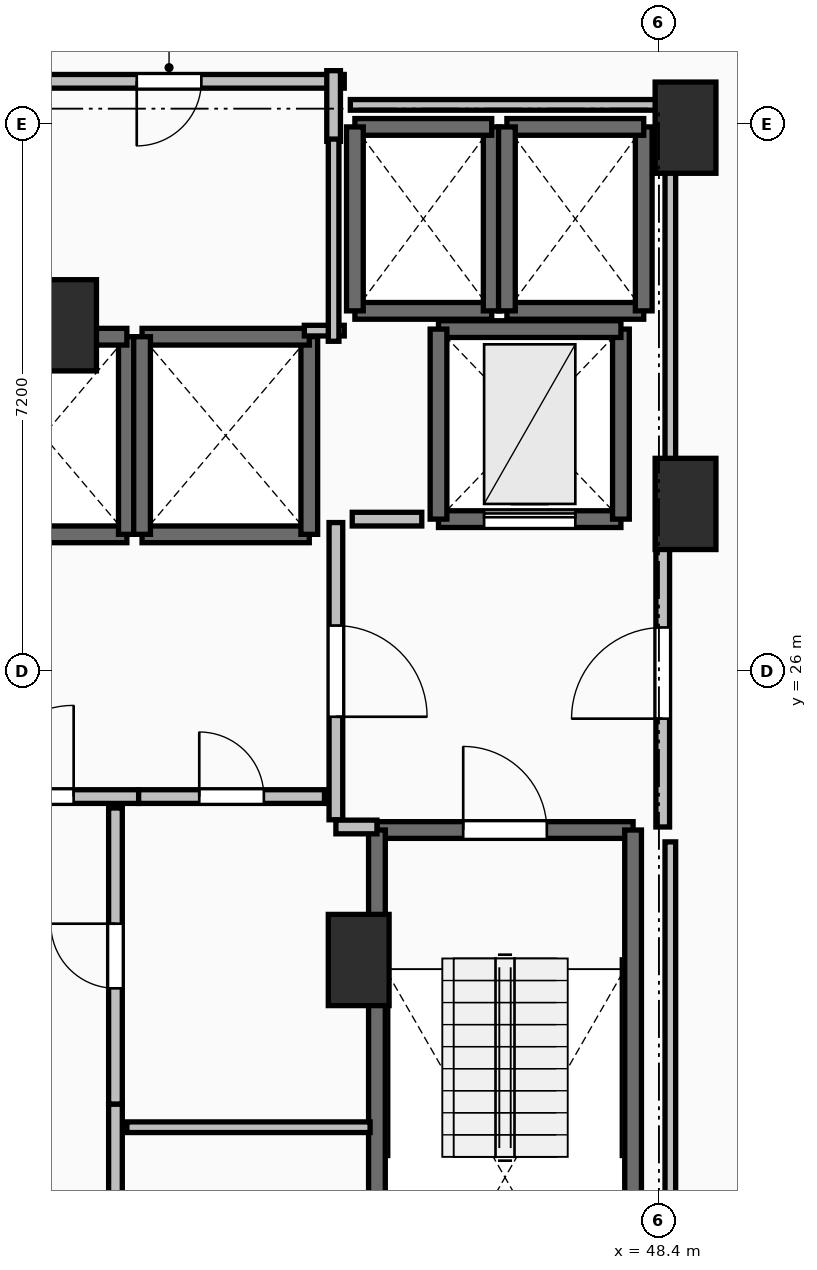
"""IFC4 building model, lengths in metres.
Left out: names, types, materials, properties, quantities, classifications, styles, units other than length and angle.
Written with IfcOpenShell. Run it as: python <this file> out.ifc"""

import sys

from ifc_helpers import new_model, si_unit, direction, frame, frame_2d, origin, origin_2d, place, context, subcontext, project, spatial, rectangle, extrude, element, fill, save


model = new_model("IFC4")
c1 = context("Model", 3, precision=1e-05, world=origin(), true_north=direction((0.0, 1.0)))
c2 = subcontext(c1, "Body", "Model", "MODEL_VIEW")
j1 = project(units=[si_unit("LENGTHUNIT", "METRE"), si_unit("PLANEANGLEUNIT", "RADIAN")], contexts=[c1])
p1 = place(None, origin())
s1 = spatial("IfcSite", under=j1, at=p1, CompositionType="ELEMENT")
p2 = place(p1, origin())
s2 = spatial("IfcBuilding", under=s1, at=p2, CompositionType="ELEMENT")
p3 = place(p2, frame((0.0, 0.0, 164.1)))
s3 = spatial("IfcBuildingStorey", under=s2, at=p3, CompositionType="ELEMENT", Elevation=164.1)
for number, where, z_axis, x_axis in (
    (1, (48.75, 33.15, 0.0), (0.0, 0.0, 1.0), (1.0, 0.0, 0.0)),
    (2, (48.75, 28.2, 0.0), (0.0, 0.0, 1.0), (1.0, 0.0, 0.0)),
    (3, (44.45, 22.2, 0.0), (0.0, 0.0, 1.0), (1.0, 0.0, 0.0)),
    (4, (40.6, 30.55, 0.0), (0.0, 0.0, 1.0), (1.0, 0.0, 0.0)),
):
    element("IfcColumn", number, at=place(p3, frame(where, z_axis=z_axis, x_axis=x_axis)), inside=s3, PredefinedType="PILASTER", context=c2, shape_type="SweptSolid", body=[
        extrude(rectangle(XDim=0.8, YDim=1.2, at=origin_2d()), origin(), (0.0, 0.0, 1.0), 3.5),
    ])
p4 = place(p3, frame((44.69, 23.91, 0.0), z_axis=(0.0, 0.0, 1.0), x_axis=(1.0, 0.0, 0.0)))
e5 = element("IfcWall", 5, at=p4, inside=s3, PredefinedType="SOLIDWALL", context=c2, shape_type="SweptSolid", body=[
    extrude(rectangle(XDim=3.37, YDim=0.22, at=frame_2d((1.685, 0.0))), origin(), (0.0, 0.0, 1.0), 3.24),
])
p5 = place(p4, frame((1.135, 0.0, 0.0)))
e6 = element("IfcOpeningElement", 6, at=p5, cuts=e5, PredefinedType="OPENING", context=c2, shape_type="SweptSolid", body=[
    extrude(rectangle(XDim=1.1, YDim=2.15, at=frame_2d((0.55, 1.075))), frame((0.0, 0.125, 0.0), z_axis=(0.0, -1.0, 0.0), x_axis=(1.0, 0.0, 0.0)), (0.0, 0.0, 1.0), 0.25),
])
for number, where, z_axis, x_axis in (
    (7, (48.06, 23.91, 0.0), (0.0, 0.0, 1.0), (0.0, -1.0, 0.0)),
    (8, (44.69, 16.49, 0.0), (0.0, 0.0, 1.0), (0.0, 1.0, 0.0)),
):
    element("IfcWall", number, at=place(p3, frame(where, z_axis=z_axis, x_axis=x_axis)), inside=s3, PredefinedType="SOLIDWALL", context=c2, shape_type="SweptSolid", body=[
        extrude(rectangle(XDim=7.42, YDim=0.22, at=frame_2d((3.71, 0.0))), origin(), (0.0, 0.0, 1.0), 3.24),
    ])
p6 = place(p3, frame((39.2, 27.8, 0.0), z_axis=(0.0, 0.0, 1.0), x_axis=(1.0, 0.0, 0.0)))
e9 = element("IfcWall", 9, at=p6, inside=s3, PredefinedType="SOLIDWALL", context=c2, shape_type="SweptSolid", body=[
    extrude(rectangle(XDim=2.2, YDim=0.22, at=frame_2d((1.1, 0.0))), origin(), (0.0, 0.0, 1.0), 3.24),
])
p7 = place(p3, frame((41.4, 27.8, 0.0), z_axis=(0.0, 0.0, 1.0), x_axis=(0.0, 1.0, 0.0)))
e10 = element("IfcWall", 10, at=p7, inside=s3, PredefinedType="SOLIDWALL", context=c2, shape_type="SweptSolid", body=[
    extrude(rectangle(XDim=2.6, YDim=0.22, at=frame_2d((1.3, 0.0))), origin(), (0.0, 0.0, 1.0), 3.24),
])
for number, where, z_axis, x_axis in (
    (11, (41.4, 30.4, 0.0), (0.0, 0.0, 1.0), (-1.0, 0.0, 0.0)),
    (12, (41.6, 27.8, 0.0), (0.0, 0.0, 1.0), (1.0, 0.0, 0.0)),
):
    element("IfcWall", number, at=place(p3, frame(where, z_axis=z_axis, x_axis=x_axis)), inside=s3, PredefinedType="SOLIDWALL", context=c2, shape_type="SweptSolid", body=[
        extrude(rectangle(XDim=2.2, YDim=0.22, at=frame_2d((1.1, 0.0))), origin(), (0.0, 0.0, 1.0), 3.24),
    ])
p8 = place(p3, frame((43.8, 27.8, 0.0), z_axis=(0.0, 0.0, 1.0), x_axis=(0.0, 1.0, 0.0)))
e13 = element("IfcWall", 13, at=p8, inside=s3, PredefinedType="SOLIDWALL", context=c2, shape_type="SweptSolid", body=[
    extrude(rectangle(XDim=2.6, YDim=0.22, at=frame_2d((1.3, 0.0))), origin(), (0.0, 0.0, 1.0), 3.24),
])
p9 = place(p3, frame((43.8, 30.4, 0.0), z_axis=(0.0, 0.0, 1.0), x_axis=(-1.0, 0.0, 0.0)))
e14 = element("IfcWall", 14, at=p9, inside=s3, PredefinedType="SOLIDWALL", context=c2, shape_type="SweptSolid", body=[
    extrude(rectangle(XDim=2.2, YDim=0.22, at=frame_2d((1.1, 0.0))), origin(), (0.0, 0.0, 1.0), 3.24),
])
p10 = place(p3, frame((41.6, 30.4, 0.0), z_axis=(0.0, 0.0, 1.0), x_axis=(0.0, -1.0, 0.0)))
e15 = element("IfcWall", 15, at=p10, inside=s3, PredefinedType="SOLIDWALL", context=c2, shape_type="SweptSolid", body=[
    extrude(rectangle(XDim=2.6, YDim=0.22, at=frame_2d((1.3, 0.0))), origin(), (0.0, 0.0, 1.0), 3.24),
])
p11 = place(p3, frame((44.4, 30.74, 0.0), z_axis=(0.0, 0.0, 1.0), x_axis=(1.0, 0.0, 0.0)))
e16 = element("IfcWall", 16, at=p11, inside=s3, PredefinedType="SOLIDWALL", context=c2, shape_type="SweptSolid", body=[
    extrude(rectangle(XDim=1.8, YDim=0.22, at=frame_2d((0.9, 0.0))), origin(), (0.0, 0.0, 1.0), 3.24),
])
p12 = place(p3, frame((46.2, 30.74, 0.0), z_axis=(0.0, 0.0, 1.0), x_axis=(0.0, 1.0, 0.0)))
e17 = element("IfcWall", 17, at=p12, inside=s3, PredefinedType="SOLIDWALL", context=c2, shape_type="SweptSolid", body=[
    extrude(rectangle(XDim=2.42, YDim=0.22, at=frame_2d((1.21, 0.0))), origin(), (0.0, 0.0, 1.0), 3.24),
])
p13 = place(p3, frame((46.2, 33.16, 0.0), z_axis=(0.0, 0.0, 1.0), x_axis=(-1.0, 0.0, 0.0)))
e18 = element("IfcWall", 18, at=p13, inside=s3, PredefinedType="SOLIDWALL", context=c2, shape_type="SweptSolid", body=[
    extrude(rectangle(XDim=1.8, YDim=0.22, at=frame_2d((0.9, 0.0))), origin(), (0.0, 0.0, 1.0), 3.24),
])
p14 = place(p3, frame((44.4, 33.16, 0.0), z_axis=(0.0, 0.0, 1.0), x_axis=(0.0, -1.0, 0.0)))
e19 = element("IfcWall", 19, at=p14, inside=s3, PredefinedType="SOLIDWALL", context=c2, shape_type="SweptSolid", body=[
    extrude(rectangle(XDim=2.42, YDim=0.22, at=frame_2d((1.21, 0.0))), origin(), (0.0, 0.0, 1.0), 3.24),
])
p15 = place(p3, frame((46.4, 30.74, 0.0), z_axis=(0.0, 0.0, 1.0), x_axis=(1.0, 0.0, 0.0)))
e20 = element("IfcWall", 20, at=p15, inside=s3, PredefinedType="SOLIDWALL", context=c2, shape_type="SweptSolid", body=[
    extrude(rectangle(XDim=1.8, YDim=0.22, at=frame_2d((0.9, 0.0))), origin(), (0.0, 0.0, 1.0), 3.24),
])
p16 = place(p3, frame((48.2, 30.74, 0.0), z_axis=(0.0, 0.0, 1.0), x_axis=(0.0, 1.0, 0.0)))
e21 = element("IfcWall", 21, at=p16, inside=s3, PredefinedType="SOLIDWALL", context=c2, shape_type="SweptSolid", body=[
    extrude(rectangle(XDim=2.42, YDim=0.22, at=frame_2d((1.21, 0.0))), origin(), (0.0, 0.0, 1.0), 3.24),
])
p17 = place(p3, frame((48.2, 33.16, 0.0), z_axis=(0.0, 0.0, 1.0), x_axis=(-1.0, 0.0, 0.0)))
e22 = element("IfcWall", 22, at=p17, inside=s3, PredefinedType="SOLIDWALL", context=c2, shape_type="SweptSolid", body=[
    extrude(rectangle(XDim=1.8, YDim=0.22, at=frame_2d((0.9, 0.0))), origin(), (0.0, 0.0, 1.0), 3.24),
])
p18 = place(p3, frame((46.4, 33.16, 0.0), z_axis=(0.0, 0.0, 1.0), x_axis=(0.0, -1.0, 0.0)))
e23 = element("IfcWall", 23, at=p18, inside=s3, PredefinedType="SOLIDWALL", context=c2, shape_type="SweptSolid", body=[
    extrude(rectangle(XDim=2.42, YDim=0.22, at=frame_2d((1.21, 0.0))), origin(), (0.0, 0.0, 1.0), 3.24),
])
p19 = place(p3, frame((45.5, 28.0, 0.0), z_axis=(0.0, 0.0, 1.0), x_axis=(1.0, 0.0, 0.0)))
e24 = element("IfcWall", 24, at=p19, inside=s3, PredefinedType="SHEAR", context=c2, shape_type="SweptSolid", body=[
    extrude(rectangle(XDim=2.4, YDim=0.22, at=frame_2d((1.2, 0.0))), origin(), (0.0, 0.0, 1.0), 3.24),
])
p20 = place(p19, frame((0.6, 0.0, 0.0)))
e25 = element("IfcOpeningElement", 25, at=p20, cuts=e24, PredefinedType="OPENING", context=c2, shape_type="SweptSolid", body=[
    extrude(rectangle(XDim=1.2, YDim=2.2, at=frame_2d((0.6, 1.1))), frame((0.0, 0.125, 0.0), z_axis=(0.0, -1.0, 0.0), x_axis=(1.0, 0.0, 0.0)), (0.0, 0.0, 1.0), 0.25),
])
p21 = place(p3, frame((47.9, 28.0, 0.0), z_axis=(0.0, 0.0, 1.0), x_axis=(0.0, 1.0, 0.0)))
e26 = element("IfcWall", 26, at=p21, inside=s3, PredefinedType="SHEAR", context=c2, shape_type="SweptSolid", body=[
    extrude(rectangle(XDim=2.5, YDim=0.22, at=frame_2d((1.25, 0.0))), origin(), (0.0, 0.0, 1.0), 3.24),
])
p22 = place(p3, frame((47.9, 30.5, 0.0), z_axis=(0.0, 0.0, 1.0), x_axis=(-1.0, 0.0, 0.0)))
e27 = element("IfcWall", 27, at=p22, inside=s3, PredefinedType="SHEAR", context=c2, shape_type="SweptSolid", body=[
    extrude(rectangle(XDim=2.4, YDim=0.22, at=frame_2d((1.2, 0.0))), origin(), (0.0, 0.0, 1.0), 3.24),
])
p23 = place(p3, frame((45.5, 30.5, 0.0), z_axis=(0.0, 0.0, 1.0), x_axis=(0.0, -1.0, 0.0)))
e28 = element("IfcWall", 28, at=p23, inside=s3, PredefinedType="SHEAR", context=c2, shape_type="SweptSolid", body=[
    extrude(rectangle(XDim=2.5, YDim=0.22, at=frame_2d((1.25, 0.0))), origin(), (0.0, 0.0, 1.0), 3.24),
])
p24 = place(p3, frame((44.15, 27.955, 0.0), z_axis=(0.0, 0.0, 1.0), x_axis=(0.0, -1.0, 0.0)))
e29 = element("IfcWall", 29, at=p24, inside=s3, PredefinedType="PARTITIONING", context=c2, shape_type="SweptSolid", body=[
    extrude(rectangle(XDim=3.91, YDim=0.18, at=frame_2d((1.955, 0.0))), origin(), (0.0, 0.0, 1.0), 3.24),
])
p25 = place(p24, frame((1.355, 0.0, 0.0)))
e30 = element("IfcOpeningElement", 30, at=p25, cuts=e29, PredefinedType="OPENING", context=c2, shape_type="SweptSolid", body=[
    extrude(rectangle(XDim=1.2, YDim=2.15, at=frame_2d((0.6, 1.075))), frame((0.0, 0.105, 0.0), z_axis=(0.0, -1.0, 0.0), x_axis=(1.0, 0.0, 0.0)), (0.0, 0.0, 1.0), 0.21),
])
p26 = place(p3, frame((44.15, 23.95, 0.0), z_axis=(0.0, 0.0, 1.0), x_axis=(1.0, 0.0, 0.0)))
e31 = element("IfcWall", 31, at=p26, inside=s3, PredefinedType="PARTITIONING", context=c2, shape_type="SweptSolid", body=[
    extrude(rectangle(XDim=0.54, YDim=0.18, at=frame_2d((0.27, 0.0))), origin(), (0.0, 0.0, 1.0), 3.24),
])
p27 = place(p3, frame((48.45, 23.95, 0.0), z_axis=(0.0, 0.0, 1.0), x_axis=(0.0, 1.0, 0.0)))
e32 = element("IfcWall", 32, at=p27, inside=s3, PredefinedType="PARTITIONING", context=c2, shape_type="SweptSolid", body=[
    extrude(rectangle(XDim=4.05, YDim=0.18, at=frame_2d((2.025, 0.0))), origin(), (0.0, 0.0, 1.0), 3.24),
])
p28 = place(p27, frame((1.425, 0.0, 0.0)))
e33 = element("IfcOpeningElement", 33, at=p28, cuts=e32, PredefinedType="OPENING", context=c2, shape_type="SweptSolid", body=[
    extrude(rectangle(XDim=1.2, YDim=2.15, at=frame_2d((0.6, 1.075))), frame((0.0, 0.105, 0.0), z_axis=(0.0, -1.0, 0.0), x_axis=(1.0, 0.0, 0.0)), (0.0, 0.0, 1.0), 0.21),
])
p29 = place(p3, frame((38.645, 24.35, 0.0), z_axis=(0.0, 0.0, 1.0), x_axis=(1.0, 0.0, 0.0)))
e34 = element("IfcWall", 34, at=p29, inside=s3, PredefinedType="PARTITIONING", context=c2, shape_type="SweptSolid", body=[
    extrude(rectangle(XDim=2.91, YDim=0.18, at=frame_2d((1.455, 0.0))), origin(), (0.0, 0.0, 1.0), 3.24),
])
p30 = place(p29, frame((0.855, 0.0, 0.0)))
e35 = element("IfcOpeningElement", 35, at=p30, cuts=e34, PredefinedType="OPENING", context=c2, shape_type="SweptSolid", body=[
    extrude(rectangle(XDim=1.2, YDim=2.15, at=frame_2d((0.6, 1.075))), frame((0.0, 0.105, 0.0), z_axis=(0.0, -1.0, 0.0), x_axis=(1.0, 0.0, 0.0)), (0.0, 0.0, 1.0), 0.21),
])
p31 = place(p3, frame((41.555, 24.35, 0.0), z_axis=(0.0, 0.0, 1.0), x_axis=(1.0, 0.0, 0.0)))
e36 = element("IfcWall", 36, at=p31, inside=s3, PredefinedType="PARTITIONING", context=c2, shape_type="SweptSolid", body=[
    extrude(rectangle(XDim=2.445, YDim=0.18, at=frame_2d((1.223, 0.0))), origin(), (0.0, 0.0, 1.0), 3.24),
])
p32 = place(p31, frame((0.798, 0.0, 0.0)))
e37 = element("IfcOpeningElement", 37, at=p32, cuts=e36, PredefinedType="OPENING", context=c2, shape_type="SweptSolid", body=[
    extrude(rectangle(XDim=0.85, YDim=2.1, at=frame_2d((0.425, 1.05))), frame((0.0, 0.105, 0.0), z_axis=(0.0, -1.0, 0.0), x_axis=(1.0, 0.0, 0.0)), (0.0, 0.0, 1.0), 0.21),
])
p33 = place(p3, frame((41.25, 16.32, 0.0), z_axis=(0.0, 0.0, 1.0), x_axis=(0.0, 1.0, 0.0)))
e38 = element("IfcWall", 38, at=p33, inside=s3, PredefinedType="PARTITIONING", context=c2, shape_type="SweptSolid", body=[
    extrude(rectangle(XDim=3.985, YDim=0.18, at=frame_2d((1.992, 0.0))), origin(), (0.0, 0.0, 1.0), 3.24),
])
p34 = place(p33, frame((1.593, 0.0, 0.0)))
e39 = element("IfcOpeningElement", 39, at=p34, cuts=e38, PredefinedType="OPENING", context=c2, shape_type="SweptSolid", body=[
    extrude(rectangle(XDim=0.8, YDim=2.05, at=frame_2d((0.4, 1.025))), frame((0.0, 0.105, 0.0), z_axis=(0.0, -1.0, 0.0), x_axis=(1.0, 0.0, 0.0)), (0.0, 0.0, 1.0), 0.21),
])
p35 = place(p3, frame((41.25, 20.305, 0.0), z_axis=(0.0, 0.0, 1.0), x_axis=(0.0, 1.0, 0.0)))
e40 = element("IfcWall", 40, at=p35, inside=s3, PredefinedType="PARTITIONING", context=c2, shape_type="SweptSolid", body=[
    extrude(rectangle(XDim=3.895, YDim=0.18, at=frame_2d((1.948, 0.0))), origin(), (0.0, 0.0, 1.0), 3.24),
])
p36 = place(p35, frame((1.522, 0.0, 0.0)))
e41 = element("IfcOpeningElement", 41, at=p36, cuts=e40, PredefinedType="OPENING", context=c2, shape_type="SweptSolid", body=[
    extrude(rectangle(XDim=0.85, YDim=2.1, at=frame_2d((0.425, 1.05))), frame((0.0, 0.105, 0.0), z_axis=(0.0, -1.0, 0.0), x_axis=(1.0, 0.0, 0.0)), (0.0, 0.0, 1.0), 0.21),
])
p37 = place(p3, frame((44.6, 20.0, 0.0), z_axis=(0.0, 0.0, 1.0), x_axis=(-1.0, 0.0, 0.0)))
e42 = element("IfcWall", 42, at=p37, inside=s3, PredefinedType="PARTITIONING", context=c2, shape_type="SweptSolid", body=[
    extrude(rectangle(XDim=3.2, YDim=0.14, at=frame_2d((1.6, 0.0))), origin(), (0.0, 0.0, 1.0), 3.24),
])
p38 = place(p3, frame((44.26, 33.76, 0.0), z_axis=(0.0, 0.0, 1.0), x_axis=(-1.0, 0.0, 0.0)))
e43 = element("IfcWall", 43, at=p38, inside=s3, PredefinedType="PARTITIONING", context=c2, shape_type="SweptSolid", body=[
    extrude(rectangle(XDim=4.61, YDim=0.18, at=frame_2d((2.305, 0.0))), origin(), (0.0, 0.0, 1.0), 3.24),
])
p39 = place(p38, frame((1.88, 0.0, 0.0)))
e44 = element("IfcOpeningElement", 44, at=p39, cuts=e43, PredefinedType="OPENING", context=c2, shape_type="SweptSolid", body=[
    extrude(rectangle(XDim=0.85, YDim=2.1, at=frame_2d((0.425, 1.05))), frame((0.0, 0.105, 0.0), z_axis=(0.0, -1.0, 0.0), x_axis=(1.0, 0.0, 0.0)), (0.0, 0.0, 1.0), 0.21),
])
p40 = place(p3, frame((44.12, 32.97, 0.0), z_axis=(0.0, 0.0, 1.0), x_axis=(0.0, 1.0, 0.0)))
e45 = element("IfcWall", 45, at=p40, inside=s3, PredefinedType="PARTITIONING", context=c2, shape_type="SweptSolid", body=[
    extrude(rectangle(XDim=0.93, YDim=0.18, at=frame_2d((0.465, 0.0))), origin(), (0.0, 0.0, 1.0), 3.24),
])
p41 = place(p3, frame((45.28, 28.0, 0.0), z_axis=(0.0, 0.0, 1.0), x_axis=(-1.0, 0.0, 0.0)))
e46 = element("IfcWall", 46, at=p41, inside=s3, PredefinedType="PARTITIONING", context=c2, shape_type="SweptSolid", body=[
    extrude(rectangle(XDim=0.915, YDim=0.18, at=frame_2d((0.458, 0.0))), origin(), (0.0, 0.0, 1.0), 3.24),
])
p42 = place(p3, frame((43.735, 30.48, 0.0), z_axis=(0.0, 0.0, 1.0), x_axis=(1.0, 0.0, 0.0)))
e47 = element("IfcWall", 47, at=p42, inside=s3, PredefinedType="PARTITIONING", context=c2, shape_type="SweptSolid", body=[
    extrude(rectangle(XDim=0.525, YDim=0.14, at=frame_2d((0.262, 0.0))), origin(), (0.0, 0.0, 1.0), 3.24),
])
p43 = place(p3, frame((44.12, 30.34, 0.0), z_axis=(0.0, 0.0, 1.0), x_axis=(0.0, 1.0, 0.0)))
e48 = element("IfcWall", 48, at=p43, inside=s3, PredefinedType="PARTITIONING", context=c2, shape_type="SweptSolid", body=[
    extrude(rectangle(XDim=2.66, YDim=0.14, at=frame_2d((1.33, 0.0))), origin(), (0.0, 0.0, 1.0), 3.24),
])
p44 = place(p3, frame((48.55, 16.24, 0.0), z_axis=(0.0, 0.0, 1.0), x_axis=(0.0, 1.0, 0.0)))
e49 = element("IfcWall", 49, at=p44, inside=s3, PredefinedType="PARTITIONING", context=c2, shape_type="SweptSolid", body=[
    extrude(rectangle(XDim=7.514, YDim=0.14, at=frame_2d((3.757, 0.0))), origin(), (0.0, 0.0, 1.0), 2.432),
])
p45 = place(p3, frame((48.55, 28.196, 0.0), z_axis=(0.0, 0.0, 1.0), x_axis=(0.0, 1.0, 0.0)))
e50 = element("IfcWall", 50, at=p45, inside=s3, PredefinedType="PARTITIONING", context=c2, shape_type="SweptSolid", body=[
    extrude(rectangle(XDim=5.254, YDim=0.14, at=frame_2d((2.627, 0.0))), origin(), (0.0, 0.0, 1.0), 2.432),
])
p46 = place(p3, frame((48.55, 33.45, 0.0), z_axis=(0.0, 0.0, 1.0), x_axis=(-1.0, 0.0, 0.0)))
e51 = element("IfcWall", 51, at=p46, inside=s3, PredefinedType="PARTITIONING", context=c2, shape_type="SweptSolid", body=[
    extrude(rectangle(XDim=4.21, YDim=0.14, at=frame_2d((2.105, 0.0))), origin(), (0.0, 0.0, 1.0), 2.432),
])
p47 = place(p5, origin())
e52 = element("IfcDoor", 52, at=p47, inside=s3, OperationType="SINGLE_SWING_LEFT", PredefinedType="DOOR", context=c2, shape_type="SweptSolid", body=[
    extrude(rectangle(XDim=1.1, YDim=2.15, at=frame_2d((0.55, 1.075))), frame((0.0, 0.025, 0.0), z_axis=(0.0, -1.0, 0.0), x_axis=(1.0, 0.0, 0.0)), (0.0, 0.0, 1.0), 0.05),
])
fill(e6, e52)
p48 = place(p20, origin())
e53 = element("IfcDoor", 53, at=p48, inside=s3, OperationType="SLIDING_TO_LEFT", PredefinedType="DOOR", context=c2, shape_type="SweptSolid", body=[
    extrude(rectangle(XDim=1.2, YDim=2.2, at=frame_2d((0.6, 1.1))), frame((0.0, 0.025, 0.0), z_axis=(0.0, -1.0, 0.0), x_axis=(1.0, 0.0, 0.0)), (0.0, 0.0, 1.0), 0.05),
])
fill(e25, e53)
p49 = place(p25, origin())
e54 = element("IfcDoor", 54, at=p49, inside=s3, OperationType="SINGLE_SWING_RIGHT", PredefinedType="DOOR", context=c2, shape_type="SweptSolid", body=[
    extrude(rectangle(XDim=1.2, YDim=2.15, at=frame_2d((0.6, 1.075))), frame((0.0, 0.025, 0.0), z_axis=(0.0, -1.0, 0.0), x_axis=(1.0, 0.0, 0.0)), (0.0, 0.0, 1.0), 0.05),
])
fill(e30, e54)
p50 = place(p28, origin())
e55 = element("IfcDoor", 55, at=p50, inside=s3, OperationType="SINGLE_SWING_LEFT", PredefinedType="DOOR", context=c2, shape_type="SweptSolid", body=[
    extrude(rectangle(XDim=1.2, YDim=2.15, at=frame_2d((0.6, 1.075))), frame((0.0, 0.025, 0.0), z_axis=(0.0, -1.0, 0.0), x_axis=(1.0, 0.0, 0.0)), (0.0, 0.0, 1.0), 0.05),
])
fill(e33, e55)
p51 = place(p30, origin())
e56 = element("IfcDoor", 56, at=p51, inside=s3, OperationType="SINGLE_SWING_RIGHT", PredefinedType="DOOR", context=c2, shape_type="SweptSolid", body=[
    extrude(rectangle(XDim=1.2, YDim=2.15, at=frame_2d((0.6, 1.075))), frame((0.0, 0.025, 0.0), z_axis=(0.0, -1.0, 0.0), x_axis=(1.0, 0.0, 0.0)), (0.0, 0.0, 1.0), 0.05),
])
fill(e35, e56)
p52 = place(p32, origin())
e57 = element("IfcDoor", 57, at=p52, inside=s3, OperationType="SINGLE_SWING_LEFT", PredefinedType="DOOR", context=c2, shape_type="SweptSolid", body=[
    extrude(rectangle(XDim=0.85, YDim=2.1, at=frame_2d((0.425, 1.05))), frame((0.0, 0.025, 0.0), z_axis=(0.0, -1.0, 0.0), x_axis=(1.0, 0.0, 0.0)), (0.0, 0.0, 1.0), 0.05),
])
fill(e37, e57)
p53 = place(p36, origin())
e58 = element("IfcDoor", 58, at=p53, inside=s3, OperationType="SINGLE_SWING_RIGHT", PredefinedType="DOOR", context=c2, shape_type="SweptSolid", body=[
    extrude(rectangle(XDim=0.85, YDim=2.1, at=frame_2d((0.425, 1.05))), frame((0.0, 0.025, 0.0), z_axis=(0.0, -1.0, 0.0), x_axis=(1.0, 0.0, 0.0)), (0.0, 0.0, 1.0), 0.05),
])
fill(e41, e58)
p54 = place(p39, origin())
e59 = element("IfcDoor", 59, at=p54, inside=s3, OperationType="SINGLE_SWING_RIGHT", PredefinedType="DOOR", context=c2, shape_type="SweptSolid", body=[
    extrude(rectangle(XDim=0.85, YDim=2.1, at=frame_2d((0.425, 1.05))), frame((0.0, 0.025, 0.0), z_axis=(0.0, -1.0, 0.0), x_axis=(1.0, 0.0, 0.0)), (0.0, 0.0, 1.0), 0.05),
])
fill(e44, e59)
save(model, sys.argv[1])
